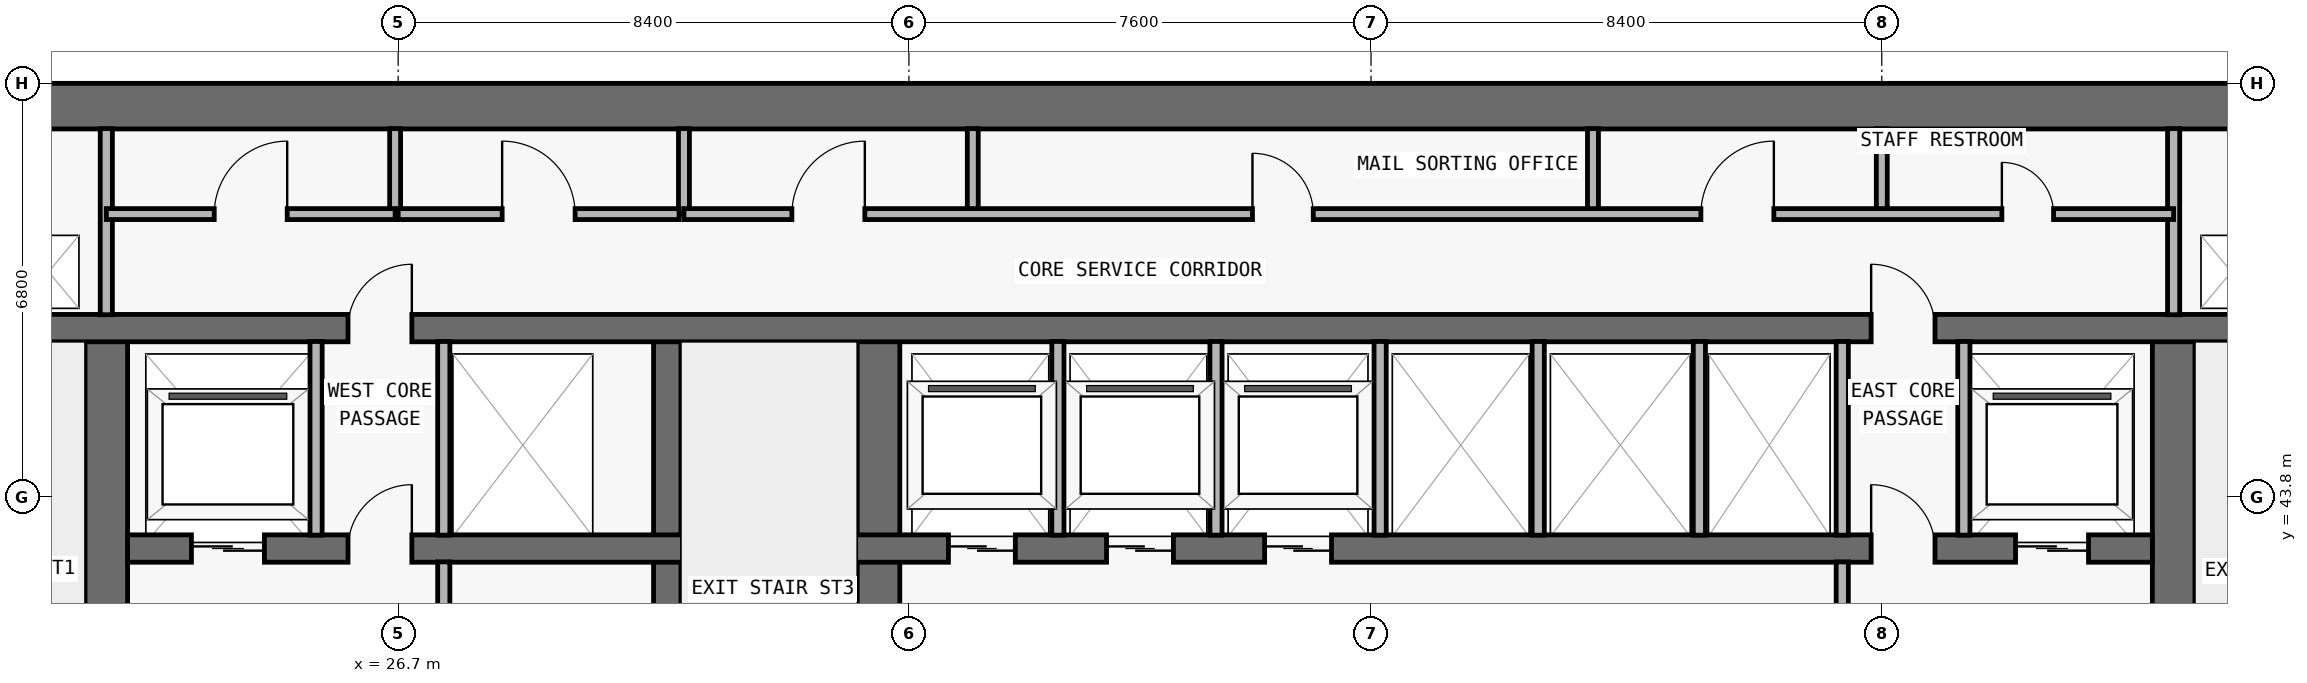
"""IFC4 building model, lengths in metres.
Left out: names, types, materials, properties, quantities, classifications, styles, units other than length and angle.
Written with IfcOpenShell. Run it as: python <this file> out.ifc"""

import sys

from ifc_helpers import new_model, si_unit, direction, frame, frame_2d, origin, place, context, subcontext, project, spatial, rectangle, extrude, element, fill, save


model = new_model("IFC4")
c1 = context("Model", 3, precision=1e-05, world=origin(), true_north=direction((0.0, 1.0)))
c2 = subcontext(c1, "Body", "Model", "MODEL_VIEW")
j1 = project(units=[si_unit("LENGTHUNIT", "METRE"), si_unit("PLANEANGLEUNIT", "RADIAN")], contexts=[c1])
p1 = place(None, origin())
s1 = spatial("IfcSite", under=j1, at=p1, CompositionType="ELEMENT")
p2 = place(p1, origin())
s2 = spatial("IfcBuilding", under=s1, at=p2, CompositionType="ELEMENT")
p3 = place(p2, frame((0.0, 0.0, 46.5)))
s3 = spatial("IfcBuildingStorey", under=s2, at=p3, CompositionType="ELEMENT", Elevation=46.5)
p4 = place(p3, frame((17.75, 50.225, 0.0), z_axis=(0.0, 0.0, 1.0), x_axis=(1.0, 0.0, 0.0)))
e1 = element("IfcWall", 1, at=p4, inside=s3, PredefinedType="SHEAR", context=c2, shape_type="SweptSolid", body=[
    extrude(rectangle(XDim=42.3, YDim=0.75, at=frame_2d((21.15, 0.0))), origin(), (0.0, 0.0, 1.0), 3.05),
])
p5 = place(p3, frame((21.9, 36.9, 0.0), z_axis=(0.0, 0.0, 1.0), x_axis=(0.0, 1.0, 0.0)))
e2 = element("IfcWall", 2, at=p5, inside=s3, PredefinedType="SHEAR", context=c2, shape_type="SweptSolid", body=[
    extrude(rectangle(XDim=9.675, YDim=0.7, at=frame_2d((4.837, 0.0))), origin(), (0.0, 0.0, 1.0), 3.05),
])
p6 = place(p5, frame((0.65, 0.0, 0.0)))
e3 = element("IfcOpeningElement", 3, at=p6, cuts=e2, PredefinedType="OPENING", context=c2, shape_type="SweptSolid", body=[
    extrude(rectangle(XDim=1.1, YDim=2.15, at=frame_2d((0.55, 1.075))), frame((0.0, 0.36, 0.0), z_axis=(0.0, -1.0, 0.0), x_axis=(1.0, 0.0, 0.0)), (0.0, 0.0, 1.0), 0.72),
])
p7 = place(p3, frame((55.9, 36.9, 0.0), z_axis=(0.0, 0.0, 1.0), x_axis=(0.0, 1.0, 0.0)))
e4 = element("IfcWall", 4, at=p7, inside=s3, PredefinedType="SHEAR", context=c2, shape_type="SweptSolid", body=[
    extrude(rectangle(XDim=9.675, YDim=0.7, at=frame_2d((4.837, 0.0))), origin(), (0.0, 0.0, 1.0), 3.05),
])
p8 = place(p7, frame((0.65, 0.0, 0.0)))
e5 = element("IfcOpeningElement", 5, at=p8, cuts=e4, PredefinedType="OPENING", context=c2, shape_type="SweptSolid", body=[
    extrude(rectangle(XDim=1.1, YDim=2.15, at=frame_2d((0.55, 1.075))), frame((0.0, 0.36, 0.0), z_axis=(0.0, -1.0, 0.0), x_axis=(1.0, 0.0, 0.0)), (0.0, 0.0, 1.0), 0.72),
])
p9 = place(p3, frame((31.125, 36.9, 0.0), z_axis=(0.0, 0.0, 1.0), x_axis=(0.0, 1.0, 0.0)))
e6 = element("IfcWall", 6, at=p9, inside=s3, PredefinedType="SHEAR", context=c2, shape_type="SweptSolid", body=[
    extrude(rectangle(XDim=9.675, YDim=0.45, at=frame_2d((4.837, 0.0))), origin(), (0.0, 0.0, 1.0), 3.05),
])
p10 = place(p3, frame((34.6, 36.9, 0.0), z_axis=(0.0, 0.0, 1.0), x_axis=(0.0, 1.0, 0.0)))
e7 = element("IfcWall", 7, at=p10, inside=s3, PredefinedType="SHEAR", context=c2, shape_type="SweptSolid", body=[
    extrude(rectangle(XDim=9.675, YDim=0.7, at=frame_2d((4.837, 0.0))), origin(), (0.0, 0.0, 1.0), 3.05),
])
p11 = place(p3, frame((22.25, 42.95, 0.0), z_axis=(0.0, 0.0, 1.0), x_axis=(1.0, 0.0, 0.0)))
e8 = element("IfcWall", 8, at=p11, inside=s3, PredefinedType="SHEAR", context=c2, shape_type="SweptSolid", body=[
    extrude(rectangle(XDim=33.3, YDim=0.45, at=frame_2d((16.65, 0.0))), origin(), (0.0, 0.0, 1.0), 3.05),
])
p12 = place(p11, frame((1.05, 0.0, 0.0)))
e9 = element("IfcOpeningElement", 9, at=p12, cuts=e8, PredefinedType="OPENING", context=c2, shape_type="SweptSolid", body=[
    extrude(rectangle(XDim=1.2, YDim=2.2, at=frame_2d((0.6, 1.1))), frame((0.0, 0.235, 0.0), z_axis=(0.0, -1.0, 0.0), x_axis=(1.0, 0.0, 0.0)), (0.0, 0.0, 1.0), 0.47),
])
p13 = place(p11, frame((31.05, 0.0, 0.0)))
e10 = element("IfcOpeningElement", 10, at=p13, cuts=e8, PredefinedType="OPENING", context=c2, shape_type="SweptSolid", body=[
    extrude(rectangle(XDim=1.2, YDim=2.2, at=frame_2d((0.6, 1.1))), frame((0.0, 0.235, 0.0), z_axis=(0.0, -1.0, 0.0), x_axis=(1.0, 0.0, 0.0)), (0.0, 0.0, 1.0), 0.47),
])
p14 = place(p11, frame((13.5, 0.0, 0.0)))
e11 = element("IfcOpeningElement", 11, at=p14, cuts=e8, PredefinedType="OPENING", context=c2, shape_type="SweptSolid", body=[
    extrude(rectangle(XDim=1.1, YDim=2.2, at=frame_2d((0.55, 1.1))), frame((0.0, 0.235, 0.0), z_axis=(0.0, -1.0, 0.0), x_axis=(1.0, 0.0, 0.0)), (0.0, 0.0, 1.0), 0.47),
])
p15 = place(p11, frame((16.1, 0.0, 0.0)))
e12 = element("IfcOpeningElement", 12, at=p15, cuts=e8, PredefinedType="OPENING", context=c2, shape_type="SweptSolid", body=[
    extrude(rectangle(XDim=1.1, YDim=2.2, at=frame_2d((0.55, 1.1))), frame((0.0, 0.235, 0.0), z_axis=(0.0, -1.0, 0.0), x_axis=(1.0, 0.0, 0.0)), (0.0, 0.0, 1.0), 0.47),
])
p16 = place(p11, frame((18.7, 0.0, 0.0)))
e13 = element("IfcOpeningElement", 13, at=p16, cuts=e8, PredefinedType="OPENING", context=c2, shape_type="SweptSolid", body=[
    extrude(rectangle(XDim=1.1, YDim=2.2, at=frame_2d((0.55, 1.1))), frame((0.0, 0.235, 0.0), z_axis=(0.0, -1.0, 0.0), x_axis=(1.0, 0.0, 0.0)), (0.0, 0.0, 1.0), 0.47),
])
p17 = place(p11, frame((3.625, 0.0, 0.0)))
e14 = element("IfcOpeningElement", 14, at=p17, cuts=e8, PredefinedType="OPENING", context=c2, shape_type="SweptSolid", body=[
    extrude(rectangle(XDim=1.05, YDim=2.15, at=frame_2d((0.525, 1.075))), frame((0.0, 0.235, 0.0), z_axis=(0.0, -1.0, 0.0), x_axis=(1.0, 0.0, 0.0)), (0.0, 0.0, 1.0), 0.47),
])
p18 = place(p11, frame((28.675, 0.0, 0.0)))
e15 = element("IfcOpeningElement", 15, at=p18, cuts=e8, PredefinedType="OPENING", context=c2, shape_type="SweptSolid", body=[
    extrude(rectangle(XDim=1.05, YDim=2.15, at=frame_2d((0.525, 1.075))), frame((0.0, 0.235, 0.0), z_axis=(0.0, -1.0, 0.0), x_axis=(1.0, 0.0, 0.0)), (0.0, 0.0, 1.0), 0.47),
])
p19 = place(p3, frame((18.2, 46.575, 0.0), z_axis=(0.0, 0.0, 1.0), x_axis=(1.0, 0.0, 0.0)))
e16 = element("IfcWall", 16, at=p19, inside=s3, PredefinedType="SHEAR", context=c2, shape_type="SweptSolid", body=[
    extrude(rectangle(XDim=41.4, YDim=0.45, at=frame_2d((20.7, 0.0))), origin(), (0.0, 0.0, 1.0), 3.05),
])
p20 = place(p19, frame((7.675, 0.0, 0.0)))
e17 = element("IfcOpeningElement", 17, at=p20, cuts=e16, PredefinedType="OPENING", context=c2, shape_type="SweptSolid", body=[
    extrude(rectangle(XDim=1.05, YDim=2.15, at=frame_2d((0.525, 1.075))), frame((0.0, 0.235, 0.0), z_axis=(0.0, -1.0, 0.0), x_axis=(1.0, 0.0, 0.0)), (0.0, 0.0, 1.0), 0.47),
])
p21 = place(p19, frame((32.725, 0.0, 0.0)))
e18 = element("IfcOpeningElement", 18, at=p21, cuts=e16, PredefinedType="OPENING", context=c2, shape_type="SweptSolid", body=[
    extrude(rectangle(XDim=1.05, YDim=2.15, at=frame_2d((0.525, 1.075))), frame((0.0, 0.235, 0.0), z_axis=(0.0, -1.0, 0.0), x_axis=(1.0, 0.0, 0.0)), (0.0, 0.0, 1.0), 0.47),
])
p22 = place(p3, frame((21.9, 46.795, 0.0), z_axis=(0.0, 0.0, 1.0), x_axis=(0.0, 1.0, 0.0)))
e19 = element("IfcWall", 19, at=p22, inside=s3, PredefinedType="PARTITIONING", context=c2, shape_type="SweptSolid", body=[
    extrude(rectangle(XDim=3.06, YDim=0.2, at=frame_2d((1.53, 0.0))), origin(), (0.0, 0.0, 1.0), 3.05),
])
p23 = place(p3, frame((25.35, 43.17, 0.0), z_axis=(0.0, 0.0, 1.0), x_axis=(0.0, 1.0, 0.0)))
e20 = element("IfcWall", 20, at=p23, inside=s3, PredefinedType="PARTITIONING", context=c2, shape_type="SweptSolid", body=[
    extrude(rectangle(XDim=3.185, YDim=0.2, at=frame_2d((1.593, 0.0))), origin(), (0.0, 0.0, 1.0), 3.05),
])
p24 = place(p3, frame((26.65, 48.45, 0.0), z_axis=(0.0, 0.0, 1.0), x_axis=(0.0, 1.0, 0.0)))
e21 = element("IfcWall", 21, at=p24, inside=s3, PredefinedType="PARTITIONING", context=c2, shape_type="SweptSolid", body=[
    extrude(rectangle(XDim=1.405, YDim=0.18, at=frame_2d((0.703, 0.0))), origin(), (0.0, 0.0, 1.0), 3.05),
])
p25 = place(p3, frame((27.45, 37.345, 0.0), z_axis=(0.0, 0.0, 1.0), x_axis=(0.0, 1.0, 0.0)))
e22 = element("IfcWall", 22, at=p25, inside=s3, PredefinedType="PARTITIONING", context=c2, shape_type="SweptSolid", body=[
    extrude(rectangle(XDim=5.385, YDim=0.2, at=frame_2d((2.692, 0.0))), origin(), (0.0, 0.0, 1.0), 3.05),
])
p26 = place(p3, frame((27.45, 43.17, 0.0), z_axis=(0.0, 0.0, 1.0), x_axis=(0.0, 1.0, 0.0)))
e23 = element("IfcWall", 23, at=p26, inside=s3, PredefinedType="PARTITIONING", context=c2, shape_type="SweptSolid", body=[
    extrude(rectangle(XDim=3.185, YDim=0.2, at=frame_2d((1.593, 0.0))), origin(), (0.0, 0.0, 1.0), 3.05),
])
for number, where, z_axis, x_axis in (
    (24, (31.4, 48.45, 0.0), (0.0, 0.0, 1.0), (0.0, 1.0, 0.0)),
    (25, (36.15, 48.45, 0.0), (0.0, 0.0, 1.0), (0.0, 1.0, 0.0)),
):
    element("IfcWall", number, at=place(p3, frame(where, z_axis=z_axis, x_axis=x_axis)), inside=s3, PredefinedType="PARTITIONING", context=c2, shape_type="SweptSolid", body=[
        extrude(rectangle(XDim=1.405, YDim=0.18, at=frame_2d((0.703, 0.0))), origin(), (0.0, 0.0, 1.0), 3.05),
    ])
for number, where, z_axis, x_axis in (
    (26, (37.55, 43.17, 0.0), (0.0, 0.0, 1.0), (0.0, 1.0, 0.0)),
    (27, (40.15, 43.17, 0.0), (0.0, 0.0, 1.0), (0.0, 1.0, 0.0)),
    (28, (42.85, 43.17, 0.0), (0.0, 0.0, 1.0), (0.0, 1.0, 0.0)),
    (29, (45.45, 43.17, 0.0), (0.0, 0.0, 1.0), (0.0, 1.0, 0.0)),
):
    element("IfcWall", number, at=place(p3, frame(where, z_axis=z_axis, x_axis=x_axis)), inside=s3, PredefinedType="PARTITIONING", context=c2, shape_type="SweptSolid", body=[
        extrude(rectangle(XDim=3.185, YDim=0.2, at=frame_2d((1.593, 0.0))), origin(), (0.0, 0.0, 1.0), 3.05),
    ])
p27 = place(p3, frame((46.35, 48.45, 0.0), z_axis=(0.0, 0.0, 1.0), x_axis=(0.0, 1.0, 0.0)))
e30 = element("IfcWall", 30, at=p27, inside=s3, PredefinedType="PARTITIONING", context=c2, shape_type="SweptSolid", body=[
    extrude(rectangle(XDim=1.405, YDim=0.18, at=frame_2d((0.703, 0.0))), origin(), (0.0, 0.0, 1.0), 3.05),
])
p28 = place(p3, frame((48.1, 43.17, 0.0), z_axis=(0.0, 0.0, 1.0), x_axis=(0.0, 1.0, 0.0)))
e31 = element("IfcWall", 31, at=p28, inside=s3, PredefinedType="PARTITIONING", context=c2, shape_type="SweptSolid", body=[
    extrude(rectangle(XDim=3.185, YDim=0.2, at=frame_2d((1.593, 0.0))), origin(), (0.0, 0.0, 1.0), 3.05),
])
p29 = place(p3, frame((50.45, 37.345, 0.0), z_axis=(0.0, 0.0, 1.0), x_axis=(0.0, 1.0, 0.0)))
e32 = element("IfcWall", 32, at=p29, inside=s3, PredefinedType="PARTITIONING", context=c2, shape_type="SweptSolid", body=[
    extrude(rectangle(XDim=5.385, YDim=0.2, at=frame_2d((2.692, 0.0))), origin(), (0.0, 0.0, 1.0), 3.05),
])
p30 = place(p3, frame((50.45, 43.17, 0.0), z_axis=(0.0, 0.0, 1.0), x_axis=(0.0, 1.0, 0.0)))
e33 = element("IfcWall", 33, at=p30, inside=s3, PredefinedType="PARTITIONING", context=c2, shape_type="SweptSolid", body=[
    extrude(rectangle(XDim=3.185, YDim=0.2, at=frame_2d((1.593, 0.0))), origin(), (0.0, 0.0, 1.0), 3.05),
])
p31 = place(p3, frame((51.1, 48.45, 0.0), z_axis=(0.0, 0.0, 1.0), x_axis=(0.0, 1.0, 0.0)))
e34 = element("IfcWall", 34, at=p31, inside=s3, PredefinedType="PARTITIONING", context=c2, shape_type="SweptSolid", body=[
    extrude(rectangle(XDim=1.405, YDim=0.18, at=frame_2d((0.703, 0.0))), origin(), (0.0, 0.0, 1.0), 3.05),
])
p32 = place(p3, frame((52.45, 43.17, 0.0), z_axis=(0.0, 0.0, 1.0), x_axis=(0.0, 1.0, 0.0)))
e35 = element("IfcWall", 35, at=p32, inside=s3, PredefinedType="PARTITIONING", context=c2, shape_type="SweptSolid", body=[
    extrude(rectangle(XDim=3.185, YDim=0.2, at=frame_2d((1.593, 0.0))), origin(), (0.0, 0.0, 1.0), 3.05),
])
p33 = place(p3, frame((55.9, 46.795, 0.0), z_axis=(0.0, 0.0, 1.0), x_axis=(0.0, 1.0, 0.0)))
e36 = element("IfcWall", 36, at=p33, inside=s3, PredefinedType="PARTITIONING", context=c2, shape_type="SweptSolid", body=[
    extrude(rectangle(XDim=3.06, YDim=0.2, at=frame_2d((1.53, 0.0))), origin(), (0.0, 0.0, 1.0), 3.05),
])
p34 = place(p3, frame((21.9, 48.45, 0.0), z_axis=(0.0, 0.0, 1.0), x_axis=(1.0, 0.0, 0.0)))
e37 = element("IfcWall", 37, at=p34, inside=s3, PredefinedType="PARTITIONING", context=c2, shape_type="SweptSolid", body=[
    extrude(rectangle(XDim=4.75, YDim=0.18, at=frame_2d((2.375, 0.0))), origin(), (0.0, 0.0, 1.0), 3.05),
])
p35 = place(p34, frame((1.775, 0.0, 0.0)))
e38 = element("IfcOpeningElement", 38, at=p35, cuts=e37, PredefinedType="OPENING", context=c2, shape_type="SweptSolid", body=[
    extrude(rectangle(XDim=1.2, YDim=2.2, at=frame_2d((0.6, 1.1))), frame((0.0, 0.1, 0.0), z_axis=(0.0, -1.0, 0.0), x_axis=(1.0, 0.0, 0.0)), (0.0, 0.0, 1.0), 0.2),
])
p36 = place(p3, frame((26.7, 48.45, 0.0), z_axis=(0.0, 0.0, 1.0), x_axis=(1.0, 0.0, 0.0)))
e39 = element("IfcWall", 39, at=p36, inside=s3, PredefinedType="PARTITIONING", context=c2, shape_type="SweptSolid", body=[
    extrude(rectangle(XDim=4.62, YDim=0.18, at=frame_2d((2.31, 0.0))), origin(), (0.0, 0.0, 1.0), 3.05),
])
p37 = place(p36, frame((1.71, 0.0, 0.0)))
e40 = element("IfcOpeningElement", 40, at=p37, cuts=e39, PredefinedType="OPENING", context=c2, shape_type="SweptSolid", body=[
    extrude(rectangle(XDim=1.2, YDim=2.2, at=frame_2d((0.6, 1.1))), frame((0.0, 0.1, 0.0), z_axis=(0.0, -1.0, 0.0), x_axis=(1.0, 0.0, 0.0)), (0.0, 0.0, 1.0), 0.2),
])
p38 = place(p3, frame((31.4, 48.45, 0.0), z_axis=(0.0, 0.0, 1.0), x_axis=(1.0, 0.0, 0.0)))
e41 = element("IfcWall", 41, at=p38, inside=s3, PredefinedType="PARTITIONING", context=c2, shape_type="SweptSolid", body=[
    extrude(rectangle(XDim=24.5, YDim=0.18, at=frame_2d((12.25, 0.0))), origin(), (0.0, 0.0, 1.0), 3.05),
])
p39 = place(p38, frame((1.775, 0.0, 0.0)))
e42 = element("IfcOpeningElement", 42, at=p39, cuts=e41, PredefinedType="OPENING", context=c2, shape_type="SweptSolid", body=[
    extrude(rectangle(XDim=1.2, YDim=2.2, at=frame_2d((0.6, 1.1))), frame((0.0, 0.1, 0.0), z_axis=(0.0, -1.0, 0.0), x_axis=(1.0, 0.0, 0.0)), (0.0, 0.0, 1.0), 0.2),
])
p40 = place(p38, frame((9.35, 0.0, 0.0)))
e43 = element("IfcOpeningElement", 43, at=p40, cuts=e41, PredefinedType="OPENING", context=c2, shape_type="SweptSolid", body=[
    extrude(rectangle(XDim=1.0, YDim=2.2, at=frame_2d((0.5, 1.1))), frame((0.0, 0.1, 0.0), z_axis=(0.0, -1.0, 0.0), x_axis=(1.0, 0.0, 0.0)), (0.0, 0.0, 1.0), 0.2),
])
p41 = place(p38, frame((16.725, 0.0, 0.0)))
e44 = element("IfcOpeningElement", 44, at=p41, cuts=e41, PredefinedType="OPENING", context=c2, shape_type="SweptSolid", body=[
    extrude(rectangle(XDim=1.2, YDim=2.2, at=frame_2d((0.6, 1.1))), frame((0.0, 0.1, 0.0), z_axis=(0.0, -1.0, 0.0), x_axis=(1.0, 0.0, 0.0)), (0.0, 0.0, 1.0), 0.2),
])
p42 = place(p38, frame((21.675, 0.0, 0.0)))
e45 = element("IfcOpeningElement", 45, at=p42, cuts=e41, PredefinedType="OPENING", context=c2, shape_type="SweptSolid", body=[
    extrude(rectangle(XDim=0.85, YDim=2.1, at=frame_2d((0.425, 1.05))), frame((0.0, 0.1, 0.0), z_axis=(0.0, -1.0, 0.0), x_axis=(1.0, 0.0, 0.0)), (0.0, 0.0, 1.0), 0.2),
])
p43 = place(p12, origin())
e46 = element("IfcDoor", 46, at=p43, inside=s3, OperationType="DOUBLE_DOOR_SLIDING", PredefinedType="DOOR", context=c2, shape_type="SweptSolid", body=[
    extrude(rectangle(XDim=1.2, YDim=2.2, at=frame_2d((0.6, 1.1))), frame((0.0, 0.025, 0.0), z_axis=(0.0, -1.0, 0.0), x_axis=(1.0, 0.0, 0.0)), (0.0, 0.0, 1.0), 0.05),
])
fill(e9, e46)
p44 = place(p13, origin())
e47 = element("IfcDoor", 47, at=p44, inside=s3, OperationType="DOUBLE_DOOR_SLIDING", PredefinedType="DOOR", context=c2, shape_type="SweptSolid", body=[
    extrude(rectangle(XDim=1.2, YDim=2.2, at=frame_2d((0.6, 1.1))), frame((0.0, 0.025, 0.0), z_axis=(0.0, -1.0, 0.0), x_axis=(1.0, 0.0, 0.0)), (0.0, 0.0, 1.0), 0.05),
])
fill(e10, e47)
p45 = place(p14, origin())
e48 = element("IfcDoor", 48, at=p45, inside=s3, OperationType="DOUBLE_DOOR_SLIDING", PredefinedType="DOOR", context=c2, shape_type="SweptSolid", body=[
    extrude(rectangle(XDim=1.1, YDim=2.2, at=frame_2d((0.55, 1.1))), frame((0.0, 0.025, 0.0), z_axis=(0.0, -1.0, 0.0), x_axis=(1.0, 0.0, 0.0)), (0.0, 0.0, 1.0), 0.05),
])
fill(e11, e48)
p46 = place(p15, origin())
e49 = element("IfcDoor", 49, at=p46, inside=s3, OperationType="DOUBLE_DOOR_SLIDING", PredefinedType="DOOR", context=c2, shape_type="SweptSolid", body=[
    extrude(rectangle(XDim=1.1, YDim=2.2, at=frame_2d((0.55, 1.1))), frame((0.0, 0.025, 0.0), z_axis=(0.0, -1.0, 0.0), x_axis=(1.0, 0.0, 0.0)), (0.0, 0.0, 1.0), 0.05),
])
fill(e12, e49)
p47 = place(p16, origin())
e50 = element("IfcDoor", 50, at=p47, inside=s3, OperationType="DOUBLE_DOOR_SLIDING", PredefinedType="DOOR", context=c2, shape_type="SweptSolid", body=[
    extrude(rectangle(XDim=1.1, YDim=2.2, at=frame_2d((0.55, 1.1))), frame((0.0, 0.025, 0.0), z_axis=(0.0, -1.0, 0.0), x_axis=(1.0, 0.0, 0.0)), (0.0, 0.0, 1.0), 0.05),
])
fill(e13, e50)
p48 = place(p17, origin())
e51 = element("IfcDoor", 51, at=p48, inside=s3, OperationType="SINGLE_SWING_RIGHT", PredefinedType="DOOR", context=c2, shape_type="SweptSolid", body=[
    extrude(rectangle(XDim=1.05, YDim=2.15, at=frame_2d((0.525, 1.075))), frame((0.0, 0.025, 0.0), z_axis=(0.0, -1.0, 0.0), x_axis=(1.0, 0.0, 0.0)), (0.0, 0.0, 1.0), 0.05),
])
fill(e14, e51)
p49 = place(p18, origin())
e52 = element("IfcDoor", 52, at=p49, inside=s3, OperationType="SINGLE_SWING_LEFT", PredefinedType="DOOR", context=c2, shape_type="SweptSolid", body=[
    extrude(rectangle(XDim=1.05, YDim=2.15, at=frame_2d((0.525, 1.075))), frame((0.0, 0.025, 0.0), z_axis=(0.0, -1.0, 0.0), x_axis=(1.0, 0.0, 0.0)), (0.0, 0.0, 1.0), 0.05),
])
fill(e15, e52)
p50 = place(p20, origin())
e53 = element("IfcDoor", 53, at=p50, inside=s3, OperationType="SINGLE_SWING_RIGHT", PredefinedType="DOOR", context=c2, shape_type="SweptSolid", body=[
    extrude(rectangle(XDim=1.05, YDim=2.15, at=frame_2d((0.525, 1.075))), frame((0.0, 0.025, 0.0), z_axis=(0.0, -1.0, 0.0), x_axis=(1.0, 0.0, 0.0)), (0.0, 0.0, 1.0), 0.05),
])
fill(e17, e53)
p51 = place(p21, origin())
e54 = element("IfcDoor", 54, at=p51, inside=s3, OperationType="SINGLE_SWING_LEFT", PredefinedType="DOOR", context=c2, shape_type="SweptSolid", body=[
    extrude(rectangle(XDim=1.05, YDim=2.15, at=frame_2d((0.525, 1.075))), frame((0.0, 0.025, 0.0), z_axis=(0.0, -1.0, 0.0), x_axis=(1.0, 0.0, 0.0)), (0.0, 0.0, 1.0), 0.05),
])
fill(e18, e54)
p52 = place(p35, origin())
e55 = element("IfcDoor", 55, at=p52, inside=s3, OperationType="SINGLE_SWING_RIGHT", PredefinedType="DOOR", context=c2, shape_type="SweptSolid", body=[
    extrude(rectangle(XDim=1.2, YDim=2.2, at=frame_2d((0.6, 1.1))), frame((0.0, 0.025, 0.0), z_axis=(0.0, -1.0, 0.0), x_axis=(1.0, 0.0, 0.0)), (0.0, 0.0, 1.0), 0.05),
])
fill(e38, e55)
p53 = place(p37, origin())
e56 = element("IfcDoor", 56, at=p53, inside=s3, OperationType="SINGLE_SWING_LEFT", PredefinedType="DOOR", context=c2, shape_type="SweptSolid", body=[
    extrude(rectangle(XDim=1.2, YDim=2.2, at=frame_2d((0.6, 1.1))), frame((0.0, 0.025, 0.0), z_axis=(0.0, -1.0, 0.0), x_axis=(1.0, 0.0, 0.0)), (0.0, 0.0, 1.0), 0.05),
])
fill(e40, e56)
p54 = place(p39, origin())
e57 = element("IfcDoor", 57, at=p54, inside=s3, OperationType="SINGLE_SWING_RIGHT", PredefinedType="DOOR", context=c2, shape_type="SweptSolid", body=[
    extrude(rectangle(XDim=1.2, YDim=2.2, at=frame_2d((0.6, 1.1))), frame((0.0, 0.025, 0.0), z_axis=(0.0, -1.0, 0.0), x_axis=(1.0, 0.0, 0.0)), (0.0, 0.0, 1.0), 0.05),
])
fill(e42, e57)
p55 = place(p40, origin())
e58 = element("IfcDoor", 58, at=p55, inside=s3, OperationType="SINGLE_SWING_LEFT", PredefinedType="DOOR", context=c2, shape_type="SweptSolid", body=[
    extrude(rectangle(XDim=1.0, YDim=2.2, at=frame_2d((0.5, 1.1))), frame((0.0, 0.025, 0.0), z_axis=(0.0, -1.0, 0.0), x_axis=(1.0, 0.0, 0.0)), (0.0, 0.0, 1.0), 0.05),
])
fill(e43, e58)
p56 = place(p41, origin())
e59 = element("IfcDoor", 59, at=p56, inside=s3, OperationType="SINGLE_SWING_RIGHT", PredefinedType="DOOR", context=c2, shape_type="SweptSolid", body=[
    extrude(rectangle(XDim=1.2, YDim=2.2, at=frame_2d((0.6, 1.1))), frame((0.0, 0.025, 0.0), z_axis=(0.0, -1.0, 0.0), x_axis=(1.0, 0.0, 0.0)), (0.0, 0.0, 1.0), 0.05),
])
fill(e44, e59)
p57 = place(p42, origin())
e60 = element("IfcDoor", 60, at=p57, inside=s3, OperationType="SINGLE_SWING_LEFT", PredefinedType="DOOR", context=c2, shape_type="SweptSolid", body=[
    extrude(rectangle(XDim=0.85, YDim=2.1, at=frame_2d((0.425, 1.05))), frame((0.0, 0.025, 0.0), z_axis=(0.0, -1.0, 0.0), x_axis=(1.0, 0.0, 0.0)), (0.0, 0.0, 1.0), 0.05),
])
fill(e45, e60)
save(model, sys.argv[1])
